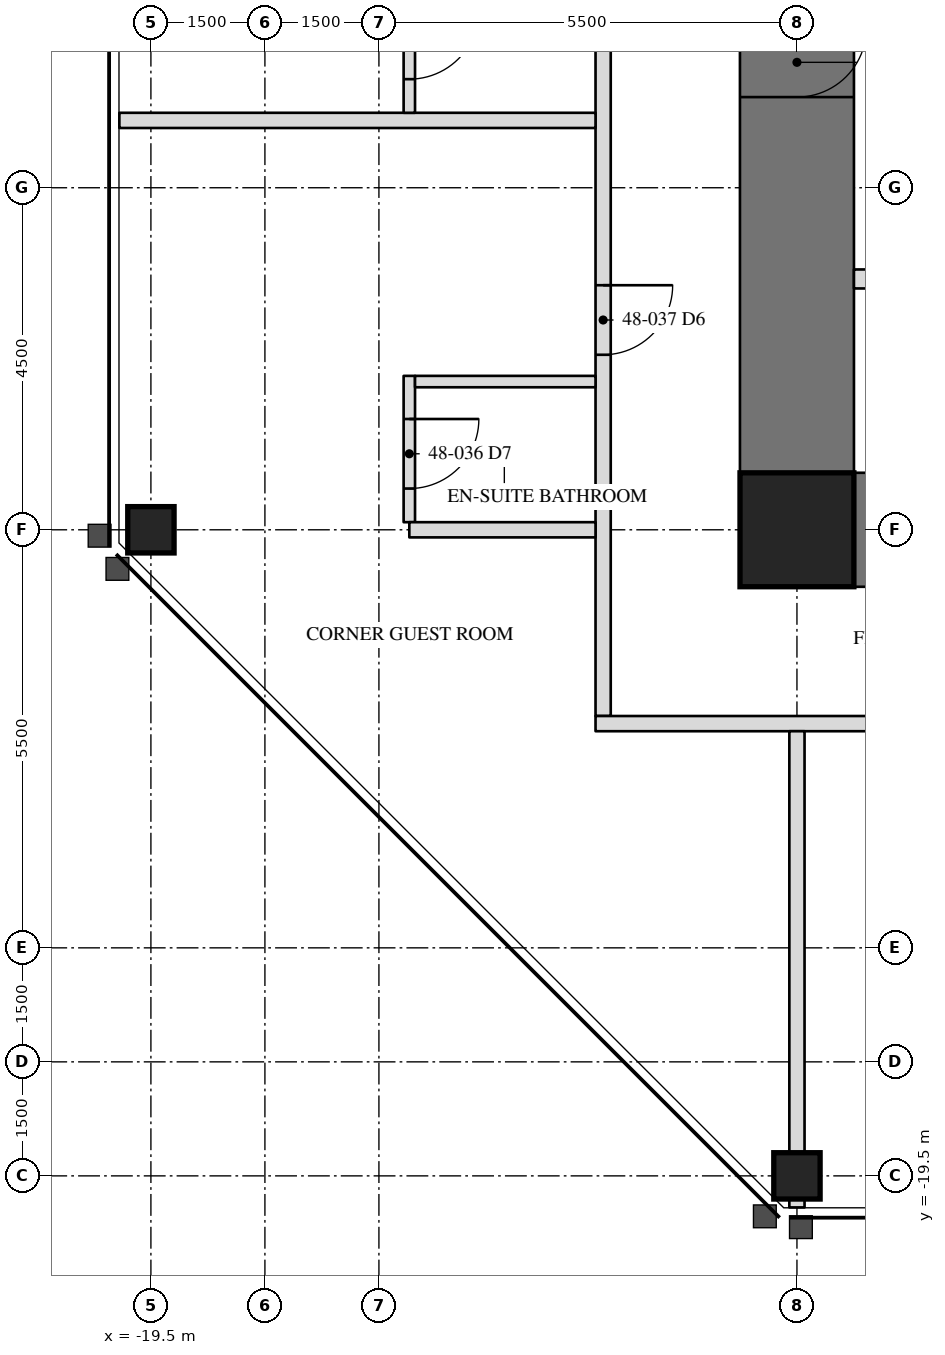
"""IFC4 building model, lengths in metres.
Left out: names, types, materials, properties, quantities, classifications, styles, units other than length and angle.
Written with IfcOpenShell. Run it as: python <this file> out.ifc"""

import sys

from ifc_helpers import new_model, si_unit, direction, frame, frame_2d, origin, origin_2d, place, context, subcontext, project, spatial, rectangle, hollow_rectangle, extrude, element, fill, save


model = new_model("IFC4")
c1 = context("Model", 3, precision=1e-05, world=origin(), true_north=direction((0.0, 1.0)))
c2 = subcontext(c1, "Body", "Model", "MODEL_VIEW")
j1 = project(units=[si_unit("LENGTHUNIT", "METRE"), si_unit("PLANEANGLEUNIT", "RADIAN")], contexts=[c1])
p1 = place(None, origin())
s1 = spatial("IfcSite", under=j1, at=p1, CompositionType="ELEMENT")
p2 = place(p1, origin())
s2 = spatial("IfcBuilding", under=s1, at=p2, CompositionType="ELEMENT")
p3 = place(p2, frame((0.0, 0.0, 204.7)))
s3 = spatial("IfcBuildingStorey", under=s2, at=p3, CompositionType="ELEMENT", Elevation=204.7)
for number, where, z_axis, x_axis in (
    (1, (-19.5, -11.0, 0.0), (0.0, 0.0, 1.0), (0.0, 1.0, 0.0)),
    (2, (-11.0, -19.5, 0.0), (0.0, 0.0, 1.0), (1.0, 0.0, 0.0)),
):
    element("IfcColumn", number, at=place(p3, frame(where, z_axis=z_axis, x_axis=x_axis)), inside=s3, PredefinedType="COLUMN", context=c2, shape_type="SweptSolid", body=[
        extrude(hollow_rectangle(XDim=0.61, YDim=0.61, WallThickness=0.076, at=origin_2d()), origin(), (0.0, 0.0, 1.0), 3.5),
    ])
p4 = place(p3, frame((-11.0, 11.0, 0.0), z_axis=(0.0, 0.0, 1.0), x_axis=(0.0, -1.0, 0.0)))
e3 = element("IfcWall", 3, at=p4, inside=s3, PredefinedType="SHEAR", context=c2, shape_type="SweptSolid", body=[
    extrude(rectangle(XDim=22.0, YDim=1.5, at=frame_2d((11.0, 0.0))), origin(), (0.0, 0.0, 1.0), 3.5),
])
p5 = place(p4, frame((15.393, 0.0, 0.0)))
e4 = element("IfcOpeningElement", 4, at=p5, cuts=e3, PredefinedType="OPENING", context=c2, shape_type="SweptSolid", body=[
    extrude(rectangle(XDim=0.915, YDim=2.134, at=frame_2d((0.458, 1.067))), frame((0.0, 0.76, 0.0), z_axis=(0.0, -1.0, 0.0), x_axis=(1.0, 0.0, 0.0)), (0.0, 0.0, 1.0), 1.52),
])
p6 = place(p3, frame((-11.0, -11.0, 0.0), z_axis=(0.0, 0.0, 1.0), x_axis=(1.0, 0.0, 0.0)))
e5 = element("IfcWall", 5, at=p6, inside=s3, PredefinedType="SHEAR", context=c2, shape_type="SweptSolid", body=[
    extrude(rectangle(XDim=4.5, YDim=1.5, at=frame_2d((2.25, 0.0))), origin(), (0.0, 0.0, 1.0), 3.5),
])
p7 = place(p3, frame((-11.0, -11.0, 0.0), z_axis=(0.0, 0.0, 1.0), x_axis=(1.0, 0.0, 0.0)))
e6 = element("IfcColumn", 6, at=p7, inside=s3, PredefinedType="COLUMN", context=c2, shape_type="SweptSolid", body=[
    extrude(hollow_rectangle(XDim=1.499, YDim=1.499, WallThickness=0.102, at=origin_2d()), origin(), (0.0, 0.0, 1.0), 3.5),
])
p8 = place(p3, frame((-6.95, -7.7, 0.0), z_axis=(0.0, 0.0, 1.0), x_axis=(-1.0, 0.0, 0.0)))
e7 = element("IfcWall", 7, at=p8, inside=s3, PredefinedType="PARTITIONING", context=c2, shape_type="SweptSolid", body=[
    extrude(rectangle(XDim=3.3, YDim=0.25, at=frame_2d((1.65, 0.0))), origin(), (0.0, 0.0, 1.0), 3.31),
])
p9 = place(p8, frame((0.45, 0.0, 0.0)))
e8 = element("IfcOpeningElement", 8, at=p9, cuts=e7, PredefinedType="OPENING", context=c2, shape_type="SweptSolid", body=[
    extrude(rectangle(XDim=1.219, YDim=2.134, at=frame_2d((0.609, 1.067))), frame((0.0, 0.135, 0.0), z_axis=(0.0, -1.0, 0.0), x_axis=(1.0, 0.0, 0.0)), (0.0, 0.0, 1.0), 0.27),
])
p10 = place(p3, frame((-13.55, 13.65, 0.0), z_axis=(0.0, 0.0, 1.0), x_axis=(0.0, -1.0, 0.0)))
e9 = element("IfcWall", 9, at=p10, inside=s3, PredefinedType="PARTITIONING", context=c2, shape_type="SweptSolid", body=[
    extrude(rectangle(XDim=27.1, YDim=0.2, at=frame_2d((13.55, 0.0))), origin(), (0.0, 0.0, 1.0), 3.31),
])
p11 = place(p10, frame((4.884, 0.0, 0.0)))
e10 = element("IfcOpeningElement", 10, at=p11, cuts=e9, PredefinedType="OPENING", context=c2, shape_type="SweptSolid", body=[
    extrude(rectangle(XDim=0.915, YDim=2.134, at=frame_2d((0.458, 1.067))), frame((0.0, 0.11, 0.0), z_axis=(0.0, -1.0, 0.0), x_axis=(1.0, 0.0, 0.0)), (0.0, 0.0, 1.0), 0.22),
])
p12 = place(p10, frame((10.433, 0.0, 0.0)))
e11 = element("IfcOpeningElement", 11, at=p12, cuts=e9, PredefinedType="OPENING", context=c2, shape_type="SweptSolid", body=[
    extrude(rectangle(XDim=0.915, YDim=2.134, at=frame_2d((0.458, 1.067))), frame((0.0, 0.11, 0.0), z_axis=(0.0, -1.0, 0.0), x_axis=(1.0, 0.0, 0.0)), (0.0, 0.0, 1.0), 0.22),
])
p13 = place(p10, frame((16.046, 0.0, 0.0)))
e12 = element("IfcOpeningElement", 12, at=p13, cuts=e9, PredefinedType="OPENING", context=c2, shape_type="SweptSolid", body=[
    extrude(rectangle(XDim=0.915, YDim=2.134, at=frame_2d((0.458, 1.067))), frame((0.0, 0.11, 0.0), z_axis=(0.0, -1.0, 0.0), x_axis=(1.0, 0.0, 0.0)), (0.0, 0.0, 1.0), 0.22),
])
p14 = place(p10, frame((21.433, 0.0, 0.0)))
e13 = element("IfcOpeningElement", 13, at=p14, cuts=e9, PredefinedType="OPENING", context=c2, shape_type="SweptSolid", body=[
    extrude(rectangle(XDim=0.915, YDim=2.134, at=frame_2d((0.458, 1.067))), frame((0.0, 0.11, 0.0), z_axis=(0.0, -1.0, 0.0), x_axis=(1.0, 0.0, 0.0)), (0.0, 0.0, 1.0), 0.22),
])
p15 = place(p3, frame((-13.65, -13.55, 0.0), z_axis=(0.0, 0.0, 1.0), x_axis=(1.0, 0.0, 0.0)))
e14 = element("IfcWall", 14, at=p15, inside=s3, PredefinedType="PARTITIONING", context=c2, shape_type="SweptSolid", body=[
    extrude(rectangle(XDim=27.1, YDim=0.2, at=frame_2d((13.55, 0.0))), origin(), (0.0, 0.0, 1.0), 3.31),
])
p16 = place(p15, frame((4.884, 0.0, 0.0)))
e15 = element("IfcOpeningElement", 15, at=p16, cuts=e14, PredefinedType="OPENING", context=c2, shape_type="SweptSolid", body=[
    extrude(rectangle(XDim=0.915, YDim=2.134, at=frame_2d((0.458, 1.067))), frame((0.0, 0.11, 0.0), z_axis=(0.0, -1.0, 0.0), x_axis=(1.0, 0.0, 0.0)), (0.0, 0.0, 1.0), 0.22),
])
p17 = place(p15, frame((10.433, 0.0, 0.0)))
e16 = element("IfcOpeningElement", 16, at=p17, cuts=e14, PredefinedType="OPENING", context=c2, shape_type="SweptSolid", body=[
    extrude(rectangle(XDim=0.915, YDim=2.134, at=frame_2d((0.458, 1.067))), frame((0.0, 0.11, 0.0), z_axis=(0.0, -1.0, 0.0), x_axis=(1.0, 0.0, 0.0)), (0.0, 0.0, 1.0), 0.22),
])
p18 = place(p15, frame((16.046, 0.0, 0.0)))
e17 = element("IfcOpeningElement", 17, at=p18, cuts=e14, PredefinedType="OPENING", context=c2, shape_type="SweptSolid", body=[
    extrude(rectangle(XDim=0.915, YDim=2.134, at=frame_2d((0.458, 1.067))), frame((0.0, 0.11, 0.0), z_axis=(0.0, -1.0, 0.0), x_axis=(1.0, 0.0, 0.0)), (0.0, 0.0, 1.0), 0.22),
])
p19 = place(p15, frame((21.433, 0.0, 0.0)))
e18 = element("IfcOpeningElement", 18, at=p19, cuts=e14, PredefinedType="OPENING", context=c2, shape_type="SweptSolid", body=[
    extrude(rectangle(XDim=0.915, YDim=2.134, at=frame_2d((0.458, 1.067))), frame((0.0, 0.11, 0.0), z_axis=(0.0, -1.0, 0.0), x_axis=(1.0, 0.0, 0.0)), (0.0, 0.0, 1.0), 0.22),
])
p20 = place(p3, frame((-13.65, -5.614, 0.0), z_axis=(0.0, 0.0, 1.0), x_axis=(-1.0, 0.0, 0.0)))
e19 = element("IfcWall", 19, at=p20, inside=s3, PredefinedType="PARTITIONING", context=c2, shape_type="SweptSolid", body=[
    extrude(rectangle(XDim=6.265, YDim=0.2, at=frame_2d((3.133, 0.0))), origin(), (0.0, 0.0, 1.0), 3.31),
])
p21 = place(p3, frame((-16.1, -3.589, 0.0), z_axis=(0.0, 0.0, 1.0), x_axis=(0.0, -1.0, 0.0)))
e20 = element("IfcWall", 20, at=p21, inside=s3, PredefinedType="PARTITIONING", context=c2, shape_type="SweptSolid", body=[
    extrude(rectangle(XDim=1.925, YDim=0.15, at=frame_2d((0.962, 0.0))), origin(), (0.0, 0.0, 1.0), 3.31),
])
p22 = place(p21, frame((0.567, 0.0, 0.0)))
e21 = element("IfcOpeningElement", 21, at=p22, cuts=e20, PredefinedType="OPENING", context=c2, shape_type="SweptSolid", body=[
    extrude(rectangle(XDim=0.915, YDim=2.032, at=frame_2d((0.458, 1.016))), frame((0.0, 0.085, 0.0), z_axis=(0.0, -1.0, 0.0), x_axis=(1.0, 0.0, 0.0)), (0.0, 0.0, 1.0), 0.17),
])
p23 = place(p3, frame((-16.1, -8.975, 0.0), z_axis=(0.0, 0.0, 1.0), x_axis=(0.0, -1.0, 0.0)))
e22 = element("IfcWall", 22, at=p23, inside=s3, PredefinedType="PARTITIONING", context=c2, shape_type="SweptSolid", body=[
    extrude(rectangle(XDim=1.925, YDim=0.15, at=frame_2d((0.962, 0.0))), origin(), (0.0, 0.0, 1.0), 3.31),
])
p24 = place(p23, frame((0.567, 0.0, 0.0)))
e23 = element("IfcOpeningElement", 23, at=p24, cuts=e22, PredefinedType="OPENING", context=c2, shape_type="SweptSolid", body=[
    extrude(rectangle(XDim=0.915, YDim=2.032, at=frame_2d((0.458, 1.016))), frame((0.0, 0.085, 0.0), z_axis=(0.0, -1.0, 0.0), x_axis=(1.0, 0.0, 0.0)), (0.0, 0.0, 1.0), 0.17),
])
p25 = place(p3, frame((-13.65, -9.05, 0.0), z_axis=(0.0, 0.0, 1.0), x_axis=(-1.0, 0.0, 0.0)))
e24 = element("IfcWall", 24, at=p25, inside=s3, PredefinedType="PARTITIONING", context=c2, shape_type="SweptSolid", body=[
    extrude(rectangle(XDim=2.375, YDim=0.15, at=frame_2d((1.188, 0.0))), origin(), (0.0, 0.0, 1.0), 3.31),
])
p26 = place(p3, frame((-13.65, -11.0, 0.0), z_axis=(0.0, 0.0, 1.0), x_axis=(-1.0, 0.0, 0.0)))
e25 = element("IfcWall", 25, at=p26, inside=s3, PredefinedType="PARTITIONING", context=c2, shape_type="SweptSolid", body=[
    extrude(rectangle(XDim=2.45, YDim=0.2, at=frame_2d((1.225, 0.0))), origin(), (0.0, 0.0, 1.0), 2.802),
])
p27 = place(p3, frame((-11.0, -13.65, 0.0), z_axis=(0.0, 0.0, 1.0), x_axis=(0.0, -1.0, 0.0)))
e26 = element("IfcWall", 26, at=p27, inside=s3, PredefinedType="PARTITIONING", context=c2, shape_type="SweptSolid", body=[
    extrude(rectangle(XDim=6.265, YDim=0.2, at=frame_2d((3.133, 0.0))), origin(), (0.0, 0.0, 1.0), 2.802),
])
p28 = place(p5, origin())
e27 = element("IfcDoor", 27, at=p28, inside=s3, OperationType="SINGLE_SWING_RIGHT", PredefinedType="DOOR", context=c2, shape_type="SweptSolid", body=[
    extrude(rectangle(XDim=0.915, YDim=2.134, at=frame_2d((0.458, 1.067))), frame((0.0, -0.675, 0.0), z_axis=(0.0, -1.0, 0.0), x_axis=(1.0, 0.0, 0.0)), (0.0, 0.0, 1.0), 0.05),
])
fill(e4, e27)
p29 = place(p22, origin())
e28 = element("IfcDoor", 28, at=p29, inside=s3, OperationType="SINGLE_SWING_LEFT", PredefinedType="DOOR", context=c2, shape_type="SweptSolid", body=[
    extrude(rectangle(XDim=0.915, YDim=2.032, at=frame_2d((0.458, 1.016))), frame((0.0, 0.025, 0.0), z_axis=(0.0, -1.0, 0.0), x_axis=(1.0, 0.0, 0.0)), (0.0, 0.0, 1.0), 0.05),
])
fill(e21, e28)
p30 = place(p24, origin())
e29 = element("IfcDoor", 29, at=p30, inside=s3, OperationType="SINGLE_SWING_LEFT", PredefinedType="DOOR", context=c2, shape_type="SweptSolid", body=[
    extrude(rectangle(XDim=0.915, YDim=2.032, at=frame_2d((0.458, 1.016))), frame((0.0, 0.025, 0.0), z_axis=(0.0, -1.0, 0.0), x_axis=(1.0, 0.0, 0.0)), (0.0, 0.0, 1.0), 0.05),
])
fill(e23, e29)
p31 = place(p14, origin())
e30 = element("IfcDoor", 30, at=p31, inside=s3, OperationType="SINGLE_SWING_LEFT", PredefinedType="DOOR", context=c2, shape_type="SweptSolid", body=[
    extrude(rectangle(XDim=0.915, YDim=2.134, at=frame_2d((0.458, 1.067))), frame((0.0, 0.025, 0.0), z_axis=(0.0, -1.0, 0.0), x_axis=(1.0, 0.0, 0.0)), (0.0, 0.0, 1.0), 0.05),
])
fill(e13, e30)
save(model, sys.argv[1])
